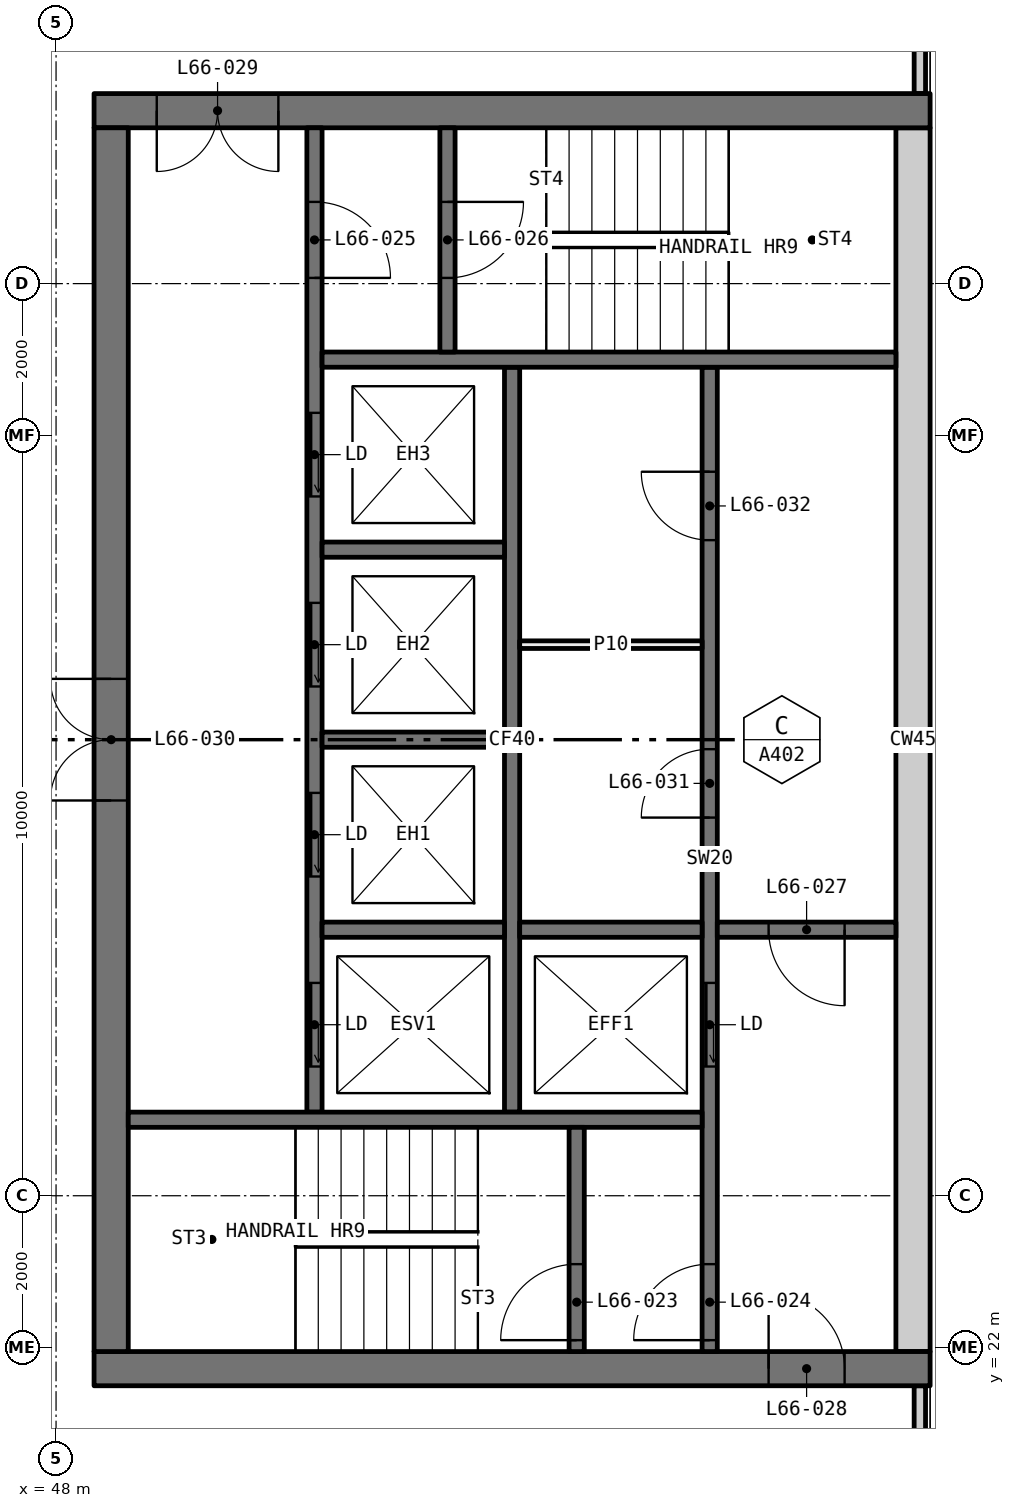
"""IFC4 building model, lengths in metres.
Left out: names, types, materials, properties, quantities, classifications, styles, units other than length and angle.
Written with IfcOpenShell. Run it as: python <this file> out.ifc"""

import sys

from ifc_helpers import new_model, si_unit, direction, frame, frame_2d, origin, place, context, subcontext, project, spatial, rectangle, extrude, element, fill, save


model = new_model("IFC4")
c1 = context("Model", 3, precision=1e-05, world=origin(), true_north=direction((0.0, 1.0)))
c2 = subcontext(c1, "Body", "Model", "MODEL_VIEW")
j1 = project(units=[si_unit("LENGTHUNIT", "METRE"), si_unit("PLANEANGLEUNIT", "RADIAN")], contexts=[c1])
p1 = place(None, origin())
s1 = spatial("IfcSite", under=j1, at=p1, CompositionType="ELEMENT")
p2 = place(p1, origin())
s2 = spatial("IfcBuilding", under=s1, at=p2, CompositionType="ELEMENT")
p3 = place(p2, frame((0.0, 0.0, 245.55)))
s3 = spatial("IfcBuildingStorey", under=s2, at=p3, CompositionType="ELEMENT", Elevation=245.55)
for number, where, z_axis, x_axis in (
    (1, (59.365, 18.71, 0.0), (0.0, 0.0, 1.0), (0.0, 1.0, 0.0)),
    (2, (59.365, 38.5, 0.0), (0.0, 0.0, 1.0), (0.0, 1.0, 0.0)),
):
    element("IfcWall", number, at=place(p3, frame(where, z_axis=z_axis, x_axis=x_axis)), inside=s3, PredefinedType="ELEMENTEDWALL", context=c2, shape_type="SweptSolid", body=[
        extrude(rectangle(XDim=2.79, YDim=0.15, at=frame_2d((1.395, 0.0))), origin(), (0.0, 0.0, 1.0), 3.05),
    ])
p4 = place(p3, frame((59.5, 21.725, 0.0), z_axis=(0.0, 0.0, 1.0), x_axis=(-1.0, 0.0, 0.0)))
e3 = element("IfcWall", 3, at=p4, inside=s3, PredefinedType="SHEAR", context=c2, shape_type="SweptSolid", body=[
    extrude(rectangle(XDim=11.0, YDim=0.45, at=frame_2d((5.5, 0.0))), origin(), (0.0, 0.0, 1.0), 3.05),
])
p5 = place(p4, frame((1.125, 0.0, 0.0)))
e4 = element("IfcOpeningElement", 4, at=p5, cuts=e3, PredefinedType="OPENING", context=c2, shape_type="SweptSolid", body=[
    extrude(rectangle(XDim=1.0, YDim=2.1, at=frame_2d((0.5, 1.05))), frame((0.0, 0.235, 0.0), z_axis=(0.0, -1.0, 0.0), x_axis=(1.0, 0.0, 0.0)), (0.0, 0.0, 1.0), 0.47),
])
p6 = place(p3, frame((59.5, 38.275, 0.0), z_axis=(0.0, 0.0, 1.0), x_axis=(-1.0, 0.0, 0.0)))
e5 = element("IfcWall", 5, at=p6, inside=s3, PredefinedType="SHEAR", context=c2, shape_type="SweptSolid", body=[
    extrude(rectangle(XDim=11.0, YDim=0.45, at=frame_2d((5.5, 0.0))), origin(), (0.0, 0.0, 1.0), 3.05),
])
p7 = place(p6, frame((8.575, 0.0, 0.0)))
e6 = element("IfcOpeningElement", 6, at=p7, cuts=e5, PredefinedType="OPENING", context=c2, shape_type="SweptSolid", body=[
    extrude(rectangle(XDim=1.6, YDim=2.1, at=frame_2d((0.8, 1.05))), frame((0.0, 0.235, 0.0), z_axis=(0.0, -1.0, 0.0), x_axis=(1.0, 0.0, 0.0)), (0.0, 0.0, 1.0), 0.47),
])
p8 = place(p3, frame((59.275, 21.95, 0.0), z_axis=(0.0, 0.0, 1.0), x_axis=(0.0, 1.0, 0.0)))
e7 = element("IfcWall", 7, at=p8, inside=s3, PredefinedType="SHEAR", context=c2, shape_type="SweptSolid", body=[
    extrude(rectangle(XDim=16.1, YDim=0.45, at=frame_2d((8.05, 0.0))), origin(), (0.0, 0.0, 1.0), 3.05),
])
p9 = place(p3, frame((48.725, 21.95, 0.0), z_axis=(0.0, 0.0, 1.0), x_axis=(0.0, 1.0, 0.0)))
e8 = element("IfcWall", 8, at=p9, inside=s3, PredefinedType="SHEAR", context=c2, shape_type="SweptSolid", body=[
    extrude(rectangle(XDim=16.1, YDim=0.45, at=frame_2d((8.05, 0.0))), origin(), (0.0, 0.0, 1.0), 3.05),
])
p10 = place(p9, frame((7.25, 0.0, 0.0)))
e9 = element("IfcOpeningElement", 9, at=p10, cuts=e8, PredefinedType="OPENING", context=c2, shape_type="SweptSolid", body=[
    extrude(rectangle(XDim=1.6, YDim=2.1, at=frame_2d((0.8, 1.05))), frame((0.0, 0.235, 0.0), z_axis=(0.0, -1.0, 0.0), x_axis=(1.0, 0.0, 0.0)), (0.0, 0.0, 1.0), 0.47),
])
p11 = place(p3, frame((56.6, 21.95, 0.0), z_axis=(0.0, 0.0, 1.0), x_axis=(0.0, 1.0, 0.0)))
e10 = element("IfcWall", 10, at=p11, inside=s3, PredefinedType="SOLIDWALL", context=c2, shape_type="SweptSolid", body=[
    extrude(rectangle(XDim=12.95, YDim=0.2, at=frame_2d((6.475, 0.0))), origin(), (0.0, 0.0, 1.0), 3.05),
])
p12 = place(p11, frame((3.75, 0.0, 0.0)))
e11 = element("IfcOpeningElement", 11, at=p12, cuts=e10, PredefinedType="OPENING", context=c2, shape_type="SweptSolid", body=[
    extrude(rectangle(XDim=1.1, YDim=2.1, at=frame_2d((0.55, 1.05))), frame((0.0, 0.11, 0.0), z_axis=(0.0, -1.0, 0.0), x_axis=(1.0, 0.0, 0.0)), (0.0, 0.0, 1.0), 0.22),
])
p13 = place(p11, frame((0.15, 0.0, 0.0)))
e12 = element("IfcOpeningElement", 12, at=p13, cuts=e10, PredefinedType="OPENING", context=c2, shape_type="SweptSolid", body=[
    extrude(rectangle(XDim=1.0, YDim=2.1, at=frame_2d((0.5, 1.05))), frame((0.0, 0.11, 0.0), z_axis=(0.0, -1.0, 0.0), x_axis=(1.0, 0.0, 0.0)), (0.0, 0.0, 1.0), 0.22),
])
p14 = place(p11, frame((7.025, 0.0, 0.0)))
e13 = element("IfcOpeningElement", 13, at=p14, cuts=e10, PredefinedType="OPENING", context=c2, shape_type="SweptSolid", body=[
    extrude(rectangle(XDim=0.9, YDim=2.1, at=frame_2d((0.45, 1.05))), frame((0.0, 0.11, 0.0), z_axis=(0.0, -1.0, 0.0), x_axis=(1.0, 0.0, 0.0)), (0.0, 0.0, 1.0), 0.22),
])
p15 = place(p11, frame((10.675, 0.0, 0.0)))
e14 = element("IfcOpeningElement", 14, at=p15, cuts=e10, PredefinedType="OPENING", context=c2, shape_type="SweptSolid", body=[
    extrude(rectangle(XDim=0.9, YDim=2.1, at=frame_2d((0.45, 1.05))), frame((0.0, 0.11, 0.0), z_axis=(0.0, -1.0, 0.0), x_axis=(1.0, 0.0, 0.0)), (0.0, 0.0, 1.0), 0.22),
])
p16 = place(p3, frame((51.4, 25.1, 0.0), z_axis=(0.0, 0.0, 1.0), x_axis=(0.0, 1.0, 0.0)))
e15 = element("IfcWall", 15, at=p16, inside=s3, PredefinedType="SOLIDWALL", context=c2, shape_type="SweptSolid", body=[
    extrude(rectangle(XDim=12.95, YDim=0.2, at=frame_2d((6.475, 0.0))), origin(), (0.0, 0.0, 1.0), 3.05),
])
p17 = place(p16, frame((0.6, 0.0, 0.0)))
e16 = element("IfcOpeningElement", 16, at=p17, cuts=e15, PredefinedType="OPENING", context=c2, shape_type="SweptSolid", body=[
    extrude(rectangle(XDim=1.1, YDim=2.1, at=frame_2d((0.55, 1.05))), frame((0.0, 0.11, 0.0), z_axis=(0.0, -1.0, 0.0), x_axis=(1.0, 0.0, 0.0)), (0.0, 0.0, 1.0), 0.22),
])
p18 = place(p16, frame((3.1, 0.0, 0.0)))
e17 = element("IfcOpeningElement", 17, at=p18, cuts=e15, PredefinedType="OPENING", context=c2, shape_type="SweptSolid", body=[
    extrude(rectangle(XDim=1.1, YDim=2.1, at=frame_2d((0.55, 1.05))), frame((0.0, 0.11, 0.0), z_axis=(0.0, -1.0, 0.0), x_axis=(1.0, 0.0, 0.0)), (0.0, 0.0, 1.0), 0.22),
])
p19 = place(p16, frame((5.6, 0.0, 0.0)))
e18 = element("IfcOpeningElement", 18, at=p19, cuts=e15, PredefinedType="OPENING", context=c2, shape_type="SweptSolid", body=[
    extrude(rectangle(XDim=1.1, YDim=2.1, at=frame_2d((0.55, 1.05))), frame((0.0, 0.11, 0.0), z_axis=(0.0, -1.0, 0.0), x_axis=(1.0, 0.0, 0.0)), (0.0, 0.0, 1.0), 0.22),
])
p20 = place(p16, frame((8.1, 0.0, 0.0)))
e19 = element("IfcOpeningElement", 19, at=p20, cuts=e15, PredefinedType="OPENING", context=c2, shape_type="SweptSolid", body=[
    extrude(rectangle(XDim=1.1, YDim=2.1, at=frame_2d((0.55, 1.05))), frame((0.0, 0.11, 0.0), z_axis=(0.0, -1.0, 0.0), x_axis=(1.0, 0.0, 0.0)), (0.0, 0.0, 1.0), 0.22),
])
p21 = place(p16, frame((10.975, 0.0, 0.0)))
e20 = element("IfcOpeningElement", 20, at=p21, cuts=e15, PredefinedType="OPENING", context=c2, shape_type="SweptSolid", body=[
    extrude(rectangle(XDim=1.0, YDim=2.1, at=frame_2d((0.5, 1.05))), frame((0.0, 0.11, 0.0), z_axis=(0.0, -1.0, 0.0), x_axis=(1.0, 0.0, 0.0)), (0.0, 0.0, 1.0), 0.22),
])
p22 = place(p3, frame((54.0, 25.1, 0.0), z_axis=(0.0, 0.0, 1.0), x_axis=(0.0, 1.0, 0.0)))
e21 = element("IfcWall", 21, at=p22, inside=s3, PredefinedType="SOLIDWALL", context=c2, shape_type="SweptSolid", body=[
    extrude(rectangle(XDim=9.8, YDim=0.2, at=frame_2d((4.9, 0.0))), origin(), (0.0, 0.0, 1.0), 3.05),
])
for number, where, z_axis, x_axis in (
    (22, (56.5, 25.0, 0.0), (0.0, 0.0, 1.0), (-1.0, 0.0, 0.0)),
    (23, (59.05, 35.0, 0.0), (0.0, 0.0, 1.0), (-1.0, 0.0, 0.0)),
):
    element("IfcWall", number, at=place(p3, frame(where, z_axis=z_axis, x_axis=x_axis)), inside=s3, PredefinedType="SOLIDWALL", context=c2, shape_type="SweptSolid", body=[
        extrude(rectangle(XDim=7.55, YDim=0.2, at=frame_2d((3.775, 0.0))), origin(), (0.0, 0.0, 1.0), 3.05),
    ])
p23 = place(p3, frame((59.05, 27.5, 0.0), z_axis=(0.0, 0.0, 1.0), x_axis=(-1.0, 0.0, 0.0)))
e24 = element("IfcWall", 24, at=p23, inside=s3, PredefinedType="SOLIDWALL", context=c2, shape_type="SweptSolid", body=[
    extrude(rectangle(XDim=2.35, YDim=0.2, at=frame_2d((1.175, 0.0))), origin(), (0.0, 0.0, 1.0), 3.05),
])
p24 = place(p23, frame((0.675, 0.0, 0.0)))
e25 = element("IfcOpeningElement", 25, at=p24, cuts=e24, PredefinedType="OPENING", context=c2, shape_type="SweptSolid", body=[
    extrude(rectangle(XDim=1.0, YDim=2.1, at=frame_2d((0.5, 1.05))), frame((0.0, 0.11, 0.0), z_axis=(0.0, -1.0, 0.0), x_axis=(1.0, 0.0, 0.0)), (0.0, 0.0, 1.0), 0.22),
])
p25 = place(p3, frame((54.85, 21.95, 0.0), z_axis=(0.0, 0.0, 1.0), x_axis=(0.0, 1.0, 0.0)))
e26 = element("IfcWall", 26, at=p25, inside=s3, PredefinedType="SOLIDWALL", context=c2, shape_type="SweptSolid", body=[
    extrude(rectangle(XDim=2.95, YDim=0.2, at=frame_2d((1.475, 0.0))), origin(), (0.0, 0.0, 1.0), 3.05),
])
p26 = place(p25, frame((0.15, 0.0, 0.0)))
e27 = element("IfcOpeningElement", 27, at=p26, cuts=e26, PredefinedType="OPENING", context=c2, shape_type="SweptSolid", body=[
    extrude(rectangle(XDim=1.0, YDim=2.1, at=frame_2d((0.5, 1.05))), frame((0.0, 0.11, 0.0), z_axis=(0.0, -1.0, 0.0), x_axis=(1.0, 0.0, 0.0)), (0.0, 0.0, 1.0), 0.22),
])
p27 = place(p3, frame((53.15, 35.1, 0.0), z_axis=(0.0, 0.0, 1.0), x_axis=(0.0, 1.0, 0.0)))
e28 = element("IfcWall", 28, at=p27, inside=s3, PredefinedType="SOLIDWALL", context=c2, shape_type="SweptSolid", body=[
    extrude(rectangle(XDim=2.95, YDim=0.2, at=frame_2d((1.475, 0.0))), origin(), (0.0, 0.0, 1.0), 3.05),
])
p28 = place(p27, frame((0.975, 0.0, 0.0)))
e29 = element("IfcOpeningElement", 29, at=p28, cuts=e28, PredefinedType="OPENING", context=c2, shape_type="SweptSolid", body=[
    extrude(rectangle(XDim=1.0, YDim=2.1, at=frame_2d((0.5, 1.05))), frame((0.0, 0.11, 0.0), z_axis=(0.0, -1.0, 0.0), x_axis=(1.0, 0.0, 0.0)), (0.0, 0.0, 1.0), 0.22),
])
for number, where, z_axis, x_axis in (
    (30, (56.5, 27.5, 0.0), (0.0, 0.0, 1.0), (-1.0, 0.0, 0.0)),
    (31, (53.9, 27.5, 0.0), (0.0, 0.0, 1.0), (-1.0, 0.0, 0.0)),
    (32, (53.9, 30.0, 0.0), (0.0, 0.0, 1.0), (-1.0, 0.0, 0.0)),
    (33, (53.9, 32.5, 0.0), (0.0, 0.0, 1.0), (-1.0, 0.0, 0.0)),
):
    element("IfcWall", number, at=place(p3, frame(where, z_axis=z_axis, x_axis=x_axis)), inside=s3, PredefinedType="SOLIDWALL", context=c2, shape_type="SweptSolid", body=[
        extrude(rectangle(XDim=2.4, YDim=0.2, at=frame_2d((1.2, 0.0))), origin(), (0.0, 0.0, 1.0), 3.05),
    ])
p29 = place(p3, frame((56.5, 31.25, 0.0), z_axis=(0.0, 0.0, 1.0), x_axis=(-1.0, 0.0, 0.0)))
e34 = element("IfcWall", 34, at=p29, inside=s3, PredefinedType="PARTITIONING", context=c2, shape_type="SweptSolid", body=[
    extrude(rectangle(XDim=2.4, YDim=0.1, at=frame_2d((1.2, 0.0))), origin(), (0.0, 0.0, 1.0), 3.05),
])
p30 = place(p17, origin())
e35 = element("IfcDoor", 35, at=p30, inside=s3, OperationType="SLIDING_TO_LEFT", PredefinedType="DOOR", context=c2, shape_type="SweptSolid", body=[
    extrude(rectangle(XDim=1.1, YDim=2.1, at=frame_2d((0.55, 1.05))), frame((0.0, 0.025, 0.0), z_axis=(0.0, -1.0, 0.0), x_axis=(1.0, 0.0, 0.0)), (0.0, 0.0, 1.0), 0.05),
])
fill(e16, e35)
p31 = place(p18, origin())
e36 = element("IfcDoor", 36, at=p31, inside=s3, OperationType="SLIDING_TO_LEFT", PredefinedType="DOOR", context=c2, shape_type="SweptSolid", body=[
    extrude(rectangle(XDim=1.1, YDim=2.1, at=frame_2d((0.55, 1.05))), frame((0.0, 0.025, 0.0), z_axis=(0.0, -1.0, 0.0), x_axis=(1.0, 0.0, 0.0)), (0.0, 0.0, 1.0), 0.05),
])
fill(e17, e36)
p32 = place(p19, origin())
e37 = element("IfcDoor", 37, at=p32, inside=s3, OperationType="SLIDING_TO_LEFT", PredefinedType="DOOR", context=c2, shape_type="SweptSolid", body=[
    extrude(rectangle(XDim=1.1, YDim=2.1, at=frame_2d((0.55, 1.05))), frame((0.0, 0.025, 0.0), z_axis=(0.0, -1.0, 0.0), x_axis=(1.0, 0.0, 0.0)), (0.0, 0.0, 1.0), 0.05),
])
fill(e18, e37)
p33 = place(p20, origin())
e38 = element("IfcDoor", 38, at=p33, inside=s3, OperationType="SLIDING_TO_LEFT", PredefinedType="DOOR", context=c2, shape_type="SweptSolid", body=[
    extrude(rectangle(XDim=1.1, YDim=2.1, at=frame_2d((0.55, 1.05))), frame((0.0, 0.025, 0.0), z_axis=(0.0, -1.0, 0.0), x_axis=(1.0, 0.0, 0.0)), (0.0, 0.0, 1.0), 0.05),
])
fill(e19, e38)
p34 = place(p12, origin())
e39 = element("IfcDoor", 39, at=p34, inside=s3, OperationType="SLIDING_TO_LEFT", PredefinedType="DOOR", context=c2, shape_type="SweptSolid", body=[
    extrude(rectangle(XDim=1.1, YDim=2.1, at=frame_2d((0.55, 1.05))), frame((0.0, 0.025, 0.0), z_axis=(0.0, -1.0, 0.0), x_axis=(1.0, 0.0, 0.0)), (0.0, 0.0, 1.0), 0.05),
])
fill(e11, e39)
p35 = place(p26, origin())
e40 = element("IfcDoor", 40, at=p35, inside=s3, OperationType="SINGLE_SWING_RIGHT", PredefinedType="DOOR", context=c2, shape_type="SweptSolid", body=[
    extrude(rectangle(XDim=1.0, YDim=2.1, at=frame_2d((0.5, 1.05))), frame((0.0, 0.025, 0.0), z_axis=(0.0, -1.0, 0.0), x_axis=(1.0, 0.0, 0.0)), (0.0, 0.0, 1.0), 0.05),
])
fill(e27, e40)
p36 = place(p13, origin())
e41 = element("IfcDoor", 41, at=p36, inside=s3, OperationType="SINGLE_SWING_RIGHT", PredefinedType="DOOR", context=c2, shape_type="SweptSolid", body=[
    extrude(rectangle(XDim=1.0, YDim=2.1, at=frame_2d((0.5, 1.05))), frame((0.0, 0.025, 0.0), z_axis=(0.0, -1.0, 0.0), x_axis=(1.0, 0.0, 0.0)), (0.0, 0.0, 1.0), 0.05),
])
fill(e12, e41)
p37 = place(p21, frame((1.0, 0.0, 0.0), x_axis=(-1.0, 0.0, 0.0)))
e42 = element("IfcDoor", 42, at=p37, inside=s3, OperationType="SINGLE_SWING_LEFT", PredefinedType="DOOR", context=c2, shape_type="SweptSolid", body=[
    extrude(rectangle(XDim=1.0, YDim=2.1, at=frame_2d((0.5, 1.05))), frame((0.0, 0.025, 0.0), z_axis=(0.0, -1.0, 0.0), x_axis=(1.0, 0.0, 0.0)), (0.0, 0.0, 1.0), 0.05),
])
fill(e20, e42)
p38 = place(p28, frame((1.0, 0.0, 0.0), x_axis=(-1.0, 0.0, 0.0)))
e43 = element("IfcDoor", 43, at=p38, inside=s3, OperationType="SINGLE_SWING_RIGHT", PredefinedType="DOOR", context=c2, shape_type="SweptSolid", body=[
    extrude(rectangle(XDim=1.0, YDim=2.1, at=frame_2d((0.5, 1.05))), frame((0.0, 0.025, 0.0), z_axis=(0.0, -1.0, 0.0), x_axis=(1.0, 0.0, 0.0)), (0.0, 0.0, 1.0), 0.05),
])
fill(e29, e43)
p39 = place(p24, origin())
e44 = element("IfcDoor", 44, at=p39, inside=s3, OperationType="SINGLE_SWING_RIGHT", PredefinedType="DOOR", context=c2, shape_type="SweptSolid", body=[
    extrude(rectangle(XDim=1.0, YDim=2.1, at=frame_2d((0.5, 1.05))), frame((0.0, 0.025, 0.0), z_axis=(0.0, -1.0, 0.0), x_axis=(1.0, 0.0, 0.0)), (0.0, 0.0, 1.0), 0.05),
])
fill(e25, e44)
p40 = place(p5, frame((1.0, 0.0, 0.0), x_axis=(-1.0, 0.0, 0.0)))
e45 = element("IfcDoor", 45, at=p40, inside=s3, OperationType="SINGLE_SWING_RIGHT", PredefinedType="DOOR", context=c2, shape_type="SweptSolid", body=[
    extrude(rectangle(XDim=1.0, YDim=2.1, at=frame_2d((0.5, 1.05))), frame((0.0, 0.025, 0.0), z_axis=(0.0, -1.0, 0.0), x_axis=(1.0, 0.0, 0.0)), (0.0, 0.0, 1.0), 0.05),
])
fill(e4, e45)
p41 = place(p7, origin())
e46 = element("IfcDoor", 46, at=p41, inside=s3, OperationType="DOUBLE_DOOR_SINGLE_SWING", PredefinedType="DOOR", context=c2, shape_type="SweptSolid", body=[
    extrude(rectangle(XDim=1.6, YDim=2.1, at=frame_2d((0.8, 1.05))), frame((0.0, 0.025, 0.0), z_axis=(0.0, -1.0, 0.0), x_axis=(1.0, 0.0, 0.0)), (0.0, 0.0, 1.0), 0.05),
])
fill(e6, e46)
p42 = place(p10, origin())
e47 = element("IfcDoor", 47, at=p42, inside=s3, OperationType="DOUBLE_DOOR_SINGLE_SWING", PredefinedType="DOOR", context=c2, shape_type="SweptSolid", body=[
    extrude(rectangle(XDim=1.6, YDim=2.1, at=frame_2d((0.8, 1.05))), frame((0.0, 0.025, 0.0), z_axis=(0.0, -1.0, 0.0), x_axis=(1.0, 0.0, 0.0)), (0.0, 0.0, 1.0), 0.05),
])
fill(e9, e47)
p43 = place(p14, origin())
e48 = element("IfcDoor", 48, at=p43, inside=s3, OperationType="SINGLE_SWING_RIGHT", PredefinedType="DOOR", context=c2, shape_type="SweptSolid", body=[
    extrude(rectangle(XDim=0.9, YDim=2.1, at=frame_2d((0.45, 1.05))), frame((0.0, 0.025, 0.0), z_axis=(0.0, -1.0, 0.0), x_axis=(1.0, 0.0, 0.0)), (0.0, 0.0, 1.0), 0.05),
])
fill(e13, e48)
p44 = place(p15, origin())
e49 = element("IfcDoor", 49, at=p44, inside=s3, OperationType="SINGLE_SWING_LEFT", PredefinedType="DOOR", context=c2, shape_type="SweptSolid", body=[
    extrude(rectangle(XDim=0.9, YDim=2.1, at=frame_2d((0.45, 1.05))), frame((0.0, 0.025, 0.0), z_axis=(0.0, -1.0, 0.0), x_axis=(1.0, 0.0, 0.0)), (0.0, 0.0, 1.0), 0.05),
])
fill(e14, e49)
save(model, sys.argv[1])
